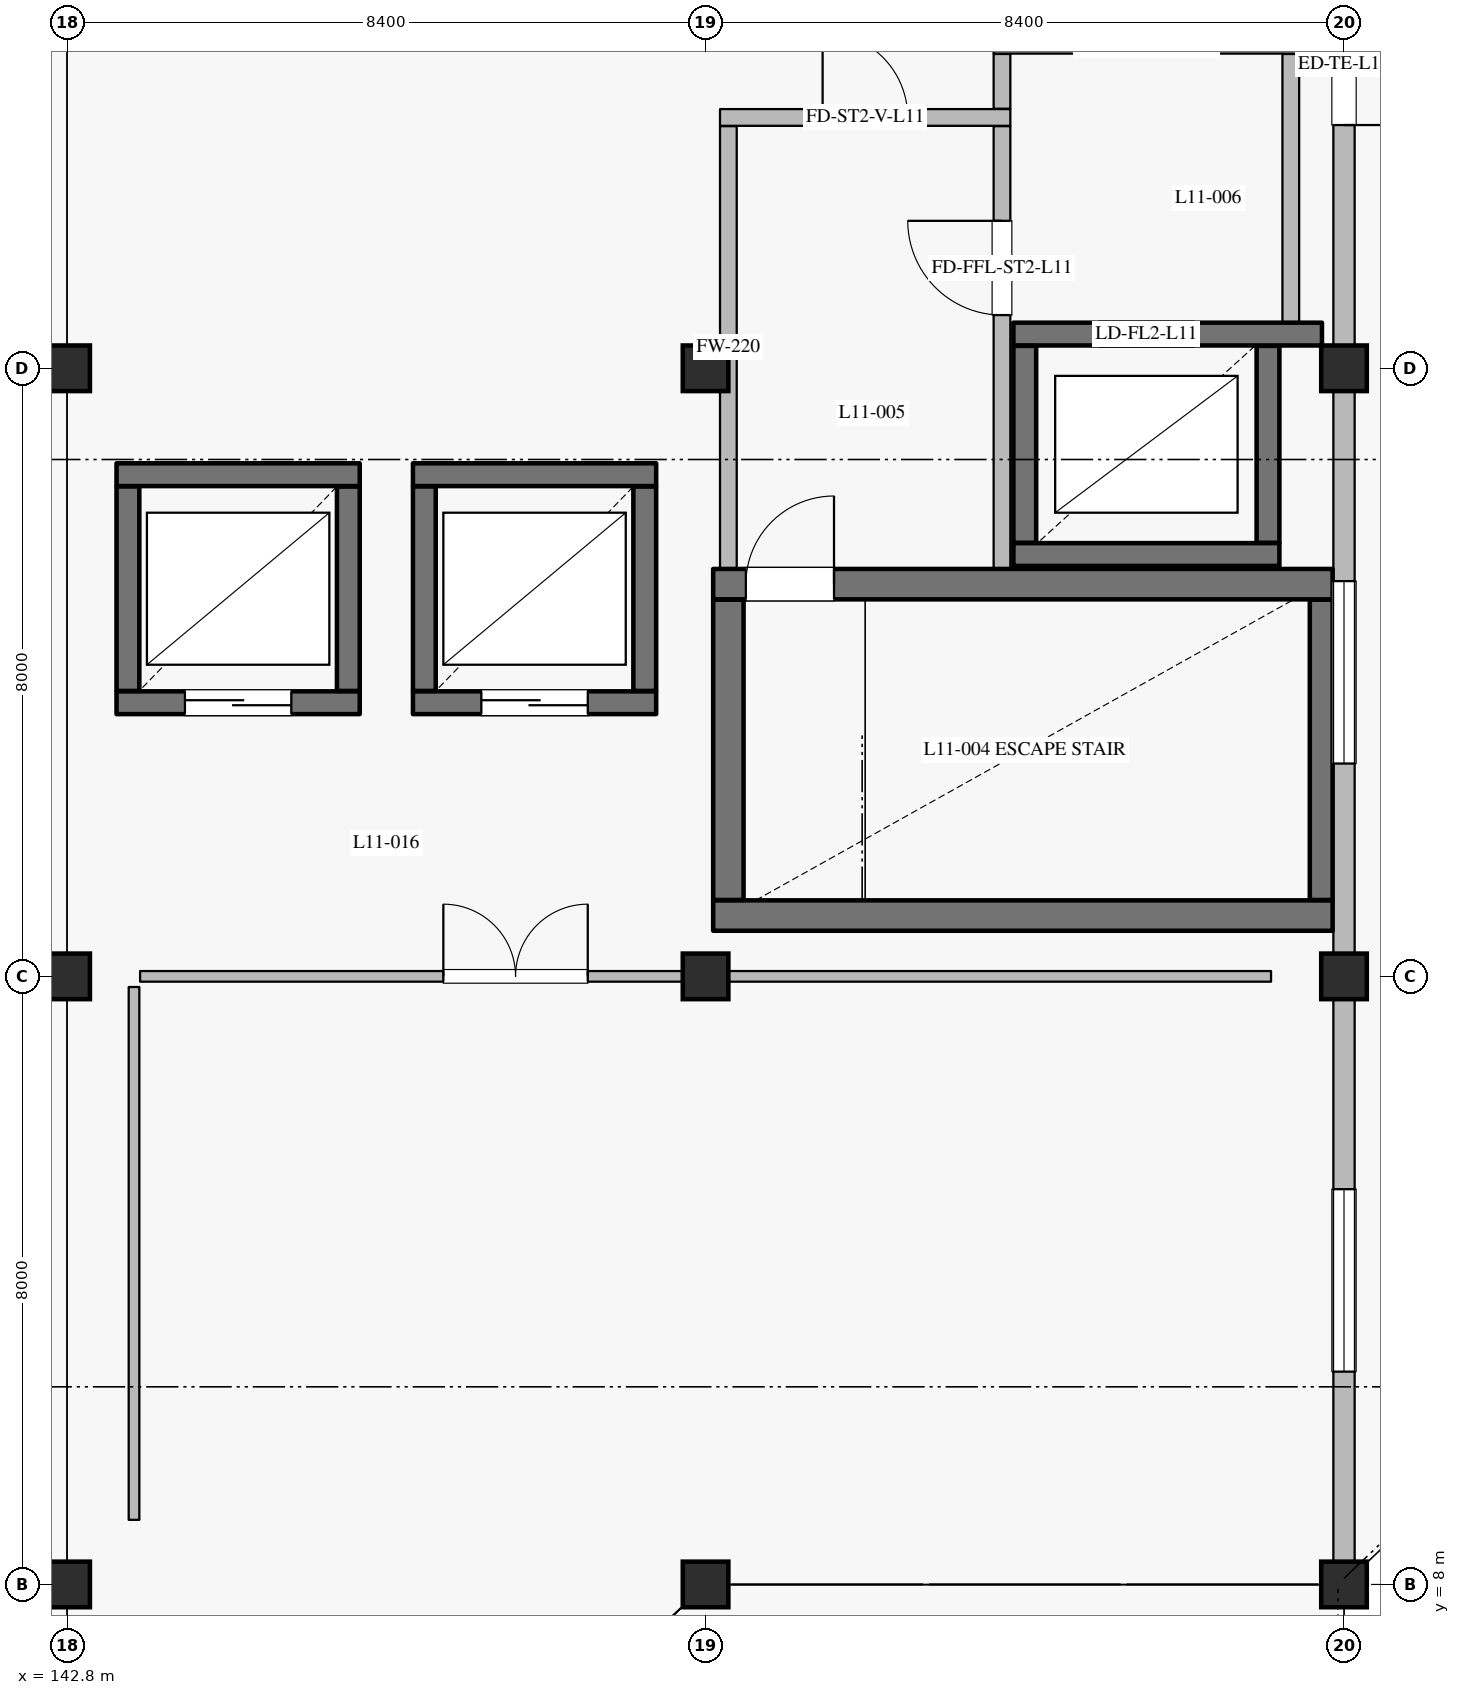
"""IFC4 building model, lengths in metres.
Left out: names, types, materials, properties, quantities, classifications, styles, units other than length and angle.
Written with IfcOpenShell. Run it as: python <this file> out.ifc"""

import sys

from ifc_helpers import new_model, si_unit, direction, frame, frame_2d, origin, origin_2d, place, context, subcontext, project, spatial, rectangle, extrude, element, fill, save


model = new_model("IFC4")
c1 = context("Model", 3, precision=1e-05, world=origin(), true_north=direction((0.0, 1.0)))
c2 = subcontext(c1, "Body", "Model", "MODEL_VIEW")
j1 = project(units=[si_unit("LENGTHUNIT", "METRE"), si_unit("PLANEANGLEUNIT", "RADIAN")], contexts=[c1])
p1 = place(None, origin())
s1 = spatial("IfcSite", under=j1, at=p1, CompositionType="ELEMENT")
p2 = place(p1, origin())
s2 = spatial("IfcBuilding", under=s1, at=p2, CompositionType="ELEMENT")
p3 = place(p2, frame((0.0, 0.0, 47.4)))
s3 = spatial("IfcBuildingStorey", under=s2, at=p3, CompositionType="ELEMENT", Elevation=47.4)
for number, where, z_axis, x_axis in (
    (1, (142.8, 16.0, 0.0), (0.0, 0.0, 1.0), (1.0, 0.0, 0.0)),
    (2, (151.2, 8.0, 0.0), (0.0, 0.0, 1.0), (1.0, 0.0, 0.0)),
    (3, (151.2, 24.0, 0.0), (0.0, 0.0, 1.0), (1.0, 0.0, 0.0)),
    (4, (159.6, 8.0, 0.0), (0.0, 0.0, 1.0), (1.0, 0.0, 0.0)),
    (5, (159.6, 24.0, 0.0), (0.0, 0.0, 1.0), (1.0, 0.0, 0.0)),
    (6, (142.8, 8.0, 0.0), (0.0, 0.0, 1.0), (1.0, 0.0, 0.0)),
    (7, (142.8, 24.0, 0.0), (0.0, 0.0, 1.0), (1.0, 0.0, 0.0)),
    (8, (151.2, 16.0, 0.0), (0.0, 0.0, 1.0), (1.0, 0.0, 0.0)),
    (9, (159.6, 16.0, 0.0), (0.0, 0.0, 1.0), (1.0, 0.0, 0.0)),
):
    element("IfcColumn", number, at=place(p3, frame(where, z_axis=z_axis, x_axis=x_axis)), inside=s3, PredefinedType="COLUMN", context=c2, shape_type="SweptSolid", body=[
        extrude(rectangle(XDim=0.6, YDim=0.6, at=origin_2d()), origin(), (0.0, 0.0, 1.0), 4.2),
    ])
p4 = place(p3, frame((159.6, 31.7, 0.0), z_axis=(0.0, 0.0, 1.0), x_axis=(0.0, -1.0, 0.0)))
e10 = element("IfcWall", 10, at=p4, inside=s3, PredefinedType="SOLIDWALL", context=c2, shape_type="SweptSolid", body=[
    extrude(rectangle(XDim=7.4, YDim=0.28, at=frame_2d((3.7, 0.0))), origin(), (0.0, 0.0, 1.0), 3.3),
])
p5 = place(p4, frame((2.9, 0.0, 0.0)))
e11 = element("IfcOpeningElement", 11, at=p5, cuts=e10, PredefinedType="OPENING", context=c2, shape_type="SweptSolid", body=[
    extrude(rectangle(XDim=1.6, YDim=2.25, at=frame_2d((0.8, 1.125))), frame((0.0, 0.15, 0.0), z_axis=(0.0, -1.0, 0.0), x_axis=(1.0, 0.0, 0.0)), (0.0, 0.0, 1.0), 0.3),
])
p6 = place(p3, frame((159.6, 23.7, 0.0), z_axis=(0.0, 0.0, 1.0), x_axis=(0.0, -1.0, 0.0)))
e12 = element("IfcWall", 12, at=p6, inside=s3, PredefinedType="SOLIDWALL", context=c2, shape_type="SweptSolid", body=[
    extrude(rectangle(XDim=7.4, YDim=0.28, at=frame_2d((3.7, 0.0))), origin(), (0.0, 0.0, 1.0), 3.3),
])
p7 = place(p6, frame((2.5, 0.0, 0.75)))
e13 = element("IfcOpeningElement", 13, at=p7, cuts=e12, PredefinedType="OPENING", context=c2, shape_type="SweptSolid", body=[
    extrude(rectangle(XDim=2.4, YDim=1.65, at=frame_2d((1.2, 0.825))), frame((0.0, 0.15, 0.0), z_axis=(0.0, -1.0, 0.0), x_axis=(1.0, 0.0, 0.0)), (0.0, 0.0, 1.0), 0.3),
])
p8 = place(p3, frame((159.6, 15.7, 0.0), z_axis=(0.0, 0.0, 1.0), x_axis=(0.0, -1.0, 0.0)))
e14 = element("IfcWall", 14, at=p8, inside=s3, PredefinedType="SOLIDWALL", context=c2, shape_type="SweptSolid", body=[
    extrude(rectangle(XDim=7.4, YDim=0.28, at=frame_2d((3.7, 0.0))), origin(), (0.0, 0.0, 1.0), 3.3),
])
p9 = place(p8, frame((2.5, 0.0, 0.75)))
e15 = element("IfcOpeningElement", 15, at=p9, cuts=e14, PredefinedType="OPENING", context=c2, shape_type="SweptSolid", body=[
    extrude(rectangle(XDim=2.4, YDim=1.65, at=frame_2d((1.2, 0.825))), frame((0.0, 0.15, 0.0), z_axis=(0.0, -1.0, 0.0), x_axis=(1.0, 0.0, 0.0)), (0.0, 0.0, 1.0), 0.3),
])
p10 = place(p3, frame((155.25, 21.55, 0.0), z_axis=(0.0, 0.0, 1.0), x_axis=(1.0, 0.0, 0.0)))
e16 = element("IfcWall", 16, at=p10, inside=s3, PredefinedType="SHEAR", context=c2, shape_type="SweptSolid", body=[
    extrude(rectangle(XDim=3.5, YDim=0.3, at=frame_2d((1.75, 0.0))), origin(), (0.0, 0.0, 1.0), 3.935),
])
p11 = place(p3, frame((158.6, 21.705, 0.0), z_axis=(0.0, 0.0, 1.0), x_axis=(0.0, 1.0, 0.0)))
e17 = element("IfcWall", 17, at=p11, inside=s3, PredefinedType="SHEAR", context=c2, shape_type="SweptSolid", body=[
    extrude(rectangle(XDim=2.59, YDim=0.3, at=frame_2d((1.295, 0.0))), origin(), (0.0, 0.0, 1.0), 3.935),
])
p12 = place(p3, frame((159.31, 24.45, 0.0), z_axis=(0.0, 0.0, 1.0), x_axis=(-1.0, 0.0, 0.0)))
e18 = element("IfcWall", 18, at=p12, inside=s3, PredefinedType="SHEAR", context=c2, shape_type="SweptSolid", body=[
    extrude(rectangle(XDim=4.06, YDim=0.3, at=frame_2d((2.03, 0.0))), origin(), (0.0, 0.0, 1.0), 3.935),
])
p13 = place(p12, frame((1.685, 0.0, 0.0)))
e19 = element("IfcOpeningElement", 19, at=p13, cuts=e18, PredefinedType="OPENING", context=c2, shape_type="SweptSolid", body=[
    extrude(rectangle(XDim=1.25, YDim=2.25, at=frame_2d((0.625, 1.125))), frame((0.0, 0.16, 0.0), z_axis=(0.0, -1.0, 0.0), x_axis=(1.0, 0.0, 0.0)), (0.0, 0.0, 1.0), 0.32),
])
p14 = place(p3, frame((155.4, 24.295, 0.0), z_axis=(0.0, 0.0, 1.0), x_axis=(0.0, -1.0, 0.0)))
e20 = element("IfcWall", 20, at=p14, inside=s3, PredefinedType="SHEAR", context=c2, shape_type="SweptSolid", body=[
    extrude(rectangle(XDim=2.59, YDim=0.3, at=frame_2d((1.295, 0.0))), origin(), (0.0, 0.0, 1.0), 3.935),
])
p15 = place(p3, frame((143.45, 19.6, 0.0), z_axis=(0.0, 0.0, 1.0), x_axis=(1.0, 0.0, 0.0)))
e21 = element("IfcWall", 21, at=p15, inside=s3, PredefinedType="SHEAR", context=c2, shape_type="SweptSolid", body=[
    extrude(rectangle(XDim=3.2, YDim=0.3, at=frame_2d((1.6, 0.0))), origin(), (0.0, 0.0, 1.0), 3.935),
])
p16 = place(p15, frame((0.9, 0.0, 0.0)))
e22 = element("IfcOpeningElement", 22, at=p16, cuts=e21, PredefinedType="OPENING", context=c2, shape_type="SweptSolid", body=[
    extrude(rectangle(XDim=1.4, YDim=2.35, at=frame_2d((0.7, 1.175))), frame((0.0, 0.16, 0.0), z_axis=(0.0, -1.0, 0.0), x_axis=(1.0, 0.0, 0.0)), (0.0, 0.0, 1.0), 0.32),
])
p17 = place(p3, frame((146.5, 19.755, 0.0), z_axis=(0.0, 0.0, 1.0), x_axis=(0.0, 1.0, 0.0)))
e23 = element("IfcWall", 23, at=p17, inside=s3, PredefinedType="SHEAR", context=c2, shape_type="SweptSolid", body=[
    extrude(rectangle(XDim=2.69, YDim=0.3, at=frame_2d((1.345, 0.0))), origin(), (0.0, 0.0, 1.0), 3.935),
])
p18 = place(p3, frame((146.65, 22.6, 0.0), z_axis=(0.0, 0.0, 1.0), x_axis=(-1.0, 0.0, 0.0)))
e24 = element("IfcWall", 24, at=p18, inside=s3, PredefinedType="SHEAR", context=c2, shape_type="SweptSolid", body=[
    extrude(rectangle(XDim=3.2, YDim=0.3, at=frame_2d((1.6, 0.0))), origin(), (0.0, 0.0, 1.0), 3.935),
])
p19 = place(p3, frame((143.6, 22.445, 0.0), z_axis=(0.0, 0.0, 1.0), x_axis=(0.0, -1.0, 0.0)))
e25 = element("IfcWall", 25, at=p19, inside=s3, PredefinedType="SHEAR", context=c2, shape_type="SweptSolid", body=[
    extrude(rectangle(XDim=2.69, YDim=0.3, at=frame_2d((1.345, 0.0))), origin(), (0.0, 0.0, 1.0), 3.935),
])
p20 = place(p3, frame((147.35, 19.6, 0.0), z_axis=(0.0, 0.0, 1.0), x_axis=(1.0, 0.0, 0.0)))
e26 = element("IfcWall", 26, at=p20, inside=s3, PredefinedType="SHEAR", context=c2, shape_type="SweptSolid", body=[
    extrude(rectangle(XDim=3.2, YDim=0.3, at=frame_2d((1.6, 0.0))), origin(), (0.0, 0.0, 1.0), 3.935),
])
p21 = place(p20, frame((0.9, 0.0, 0.0)))
e27 = element("IfcOpeningElement", 27, at=p21, cuts=e26, PredefinedType="OPENING", context=c2, shape_type="SweptSolid", body=[
    extrude(rectangle(XDim=1.4, YDim=2.35, at=frame_2d((0.7, 1.175))), frame((0.0, 0.16, 0.0), z_axis=(0.0, -1.0, 0.0), x_axis=(1.0, 0.0, 0.0)), (0.0, 0.0, 1.0), 0.32),
])
p22 = place(p3, frame((150.4, 19.755, 0.0), z_axis=(0.0, 0.0, 1.0), x_axis=(0.0, 1.0, 0.0)))
e28 = element("IfcWall", 28, at=p22, inside=s3, PredefinedType="SHEAR", context=c2, shape_type="SweptSolid", body=[
    extrude(rectangle(XDim=2.69, YDim=0.3, at=frame_2d((1.345, 0.0))), origin(), (0.0, 0.0, 1.0), 3.935),
])
p23 = place(p3, frame((150.55, 22.6, 0.0), z_axis=(0.0, 0.0, 1.0), x_axis=(-1.0, 0.0, 0.0)))
e29 = element("IfcWall", 29, at=p23, inside=s3, PredefinedType="SHEAR", context=c2, shape_type="SweptSolid", body=[
    extrude(rectangle(XDim=3.2, YDim=0.3, at=frame_2d((1.6, 0.0))), origin(), (0.0, 0.0, 1.0), 3.935),
])
p24 = place(p3, frame((147.5, 22.445, 0.0), z_axis=(0.0, 0.0, 1.0), x_axis=(0.0, -1.0, 0.0)))
e30 = element("IfcWall", 30, at=p24, inside=s3, PredefinedType="SHEAR", context=c2, shape_type="SweptSolid", body=[
    extrude(rectangle(XDim=2.69, YDim=0.3, at=frame_2d((1.345, 0.0))), origin(), (0.0, 0.0, 1.0), 3.935),
])
p25 = place(p3, frame((151.3, 16.8, 0.0), z_axis=(0.0, 0.0, 1.0), x_axis=(1.0, 0.0, 0.0)))
e31 = element("IfcWall", 31, at=p25, inside=s3, PredefinedType="SHEAR", context=c2, shape_type="SweptSolid", body=[
    extrude(rectangle(XDim=8.15, YDim=0.4, at=frame_2d((4.075, 0.0))), origin(), (0.0, 0.0, 1.0), 3.935),
])
p26 = place(p3, frame((159.3, 17.005, 0.0), z_axis=(0.0, 0.0, 1.0), x_axis=(0.0, 1.0, 0.0)))
e32 = element("IfcWall", 32, at=p26, inside=s3, PredefinedType="SHEAR", context=c2, shape_type="SweptSolid", body=[
    extrude(rectangle(XDim=3.95, YDim=0.3, at=frame_2d((1.975, 0.0))), origin(), (0.0, 0.0, 1.0), 3.935),
])
p27 = place(p3, frame((151.3, 21.16, 0.0), z_axis=(0.0, 0.0, 1.0), x_axis=(1.0, 0.0, 0.0)))
e33 = element("IfcWall", 33, at=p27, inside=s3, PredefinedType="SHEAR", context=c2, shape_type="SweptSolid", body=[
    extrude(rectangle(XDim=8.15, YDim=0.4, at=frame_2d((4.075, 0.0))), origin(), (0.0, 0.0, 1.0), 3.935),
])
p28 = place(p27, frame((0.43, 0.0, 0.0)))
e34 = element("IfcOpeningElement", 34, at=p28, cuts=e33, PredefinedType="OPENING", context=c2, shape_type="SweptSolid", body=[
    extrude(rectangle(XDim=1.16, YDim=2.2, at=frame_2d((0.58, 1.1))), frame((0.0, 0.21, 0.0), z_axis=(0.0, -1.0, 0.0), x_axis=(1.0, 0.0, 0.0)), (0.0, 0.0, 1.0), 0.42),
])
p29 = place(p3, frame((151.5, 17.005, 0.0), z_axis=(0.0, 0.0, 1.0), x_axis=(0.0, 1.0, 0.0)))
e35 = element("IfcWall", 35, at=p29, inside=s3, PredefinedType="SHEAR", context=c2, shape_type="SweptSolid", body=[
    extrude(rectangle(XDim=3.95, YDim=0.4, at=frame_2d((1.975, 0.0))), origin(), (0.0, 0.0, 1.0), 3.935),
])
p30 = place(p3, frame((151.5, 21.365, 0.0), z_axis=(0.0, 0.0, 1.0), x_axis=(0.0, 1.0, 0.0)))
e36 = element("IfcWall", 36, at=p30, inside=s3, PredefinedType="PARTITIONING", context=c2, shape_type="SweptSolid", body=[
    extrude(rectangle(XDim=5.82, YDim=0.22, at=frame_2d((2.91, 0.0))), origin(), (0.0, 0.0, 1.0), 3.935),
])
p31 = place(p3, frame((151.39, 27.3, 0.0), z_axis=(0.0, 0.0, 1.0), x_axis=(1.0, 0.0, 0.0)))
e37 = element("IfcWall", 37, at=p31, inside=s3, PredefinedType="PARTITIONING", context=c2, shape_type="SweptSolid", body=[
    extrude(rectangle(XDim=3.82, YDim=0.22, at=frame_2d((1.91, 0.0))), origin(), (0.0, 0.0, 1.0), 3.935),
])
p32 = place(p31, frame((1.35, 0.0, 0.0)))
e38 = element("IfcOpeningElement", 38, at=p32, cuts=e37, PredefinedType="OPENING", context=c2, shape_type="SweptSolid", body=[
    extrude(rectangle(XDim=1.12, YDim=2.2, at=frame_2d((0.56, 1.1))), frame((0.0, 0.12, 0.0), z_axis=(0.0, -1.0, 0.0), x_axis=(1.0, 0.0, 0.0)), (0.0, 0.0, 1.0), 0.24),
])
p33 = place(p3, frame((155.1, 21.365, 0.0), z_axis=(0.0, 0.0, 1.0), x_axis=(0.0, 1.0, 0.0)))
e39 = element("IfcWall", 39, at=p33, inside=s3, PredefinedType="PARTITIONING", context=c2, shape_type="SweptSolid", body=[
    extrude(rectangle(XDim=5.82, YDim=0.22, at=frame_2d((2.91, 0.0))), origin(), (0.0, 0.0, 1.0), 3.935),
])
p34 = place(p33, frame((3.335, 0.0, 0.0)))
e40 = element("IfcOpeningElement", 40, at=p34, cuts=e39, PredefinedType="OPENING", context=c2, shape_type="SweptSolid", body=[
    extrude(rectangle(XDim=1.24, YDim=2.2, at=frame_2d((0.62, 1.1))), frame((0.0, 0.12, 0.0), z_axis=(0.0, -1.0, 0.0), x_axis=(1.0, 0.0, 0.0)), (0.0, 0.0, 1.0), 0.24),
])
p35 = place(p3, frame((155.1, 27.415, 0.0), z_axis=(0.0, 0.0, 1.0), x_axis=(0.0, 1.0, 0.0)))
e41 = element("IfcWall", 41, at=p35, inside=s3, PredefinedType="PARTITIONING", context=c2, shape_type="SweptSolid", body=[
    extrude(rectangle(XDim=0.72, YDim=0.22, at=frame_2d((0.36, 0.0))), origin(), (0.0, 0.0, 1.0), 3.935),
])
p36 = place(p3, frame((158.9, 24.605, 0.0), z_axis=(0.0, 0.0, 1.0), x_axis=(0.0, 1.0, 0.0)))
e42 = element("IfcWall", 42, at=p36, inside=s3, PredefinedType="PARTITIONING", context=c2, shape_type="SweptSolid", body=[
    extrude(rectangle(XDim=3.53, YDim=0.22, at=frame_2d((1.765, 0.0))), origin(), (0.0, 0.0, 1.0), 3.935),
])
p37 = place(p3, frame((154.99, 28.25, 0.0), z_axis=(0.0, 0.0, 1.0), x_axis=(1.0, 0.0, 0.0)))
e43 = element("IfcWall", 43, at=p37, inside=s3, PredefinedType="PARTITIONING", context=c2, shape_type="SweptSolid", body=[
    extrude(rectangle(XDim=4.02, YDim=0.22, at=frame_2d((2.01, 0.0))), origin(), (0.0, 0.0, 1.0), 3.935),
])
p38 = place(p37, frame((1.39, 0.0, 0.0)))
e44 = element("IfcOpeningElement", 44, at=p38, cuts=e43, PredefinedType="OPENING", context=c2, shape_type="SweptSolid", body=[
    extrude(rectangle(XDim=1.24, YDim=2.2, at=frame_2d((0.62, 1.1))), frame((0.0, 0.12, 0.0), z_axis=(0.0, -1.0, 0.0), x_axis=(1.0, 0.0, 0.0)), (0.0, 0.0, 1.0), 0.24),
])
p39 = place(p3, frame((143.76, 16.0, 0.0), z_axis=(0.0, 0.0, 1.0), x_axis=(1.0, 0.0, 0.0)))
e45 = element("IfcWall", 45, at=p39, inside=s3, PredefinedType="PARTITIONING", context=c2, shape_type="SweptSolid", body=[
    extrude(rectangle(XDim=7.736, YDim=0.14, at=frame_2d((3.868, 0.0))), origin(), (0.0, 0.0, 1.0), 3.935),
])
p40 = place(p39, frame((3.99, 0.0, 0.0)))
e46 = element("IfcOpeningElement", 46, at=p40, cuts=e45, PredefinedType="OPENING", context=c2, shape_type="SweptSolid", body=[
    extrude(rectangle(XDim=1.9, YDim=2.4, at=frame_2d((0.95, 1.2))), frame((0.0, 0.08, 0.0), z_axis=(0.0, -1.0, 0.0), x_axis=(1.0, 0.0, 0.0)), (0.0, 0.0, 1.0), 0.16),
])
p41 = place(p3, frame((143.68, 8.85, 0.0), z_axis=(0.0, 0.0, 1.0), x_axis=(0.0, 1.0, 0.0)))
e47 = element("IfcWall", 47, at=p41, inside=s3, PredefinedType="PARTITIONING", context=c2, shape_type="SweptSolid", body=[
    extrude(rectangle(XDim=7.01, YDim=0.14, at=frame_2d((3.505, 0.0))), origin(), (0.0, 0.0, 1.0), 3.935),
])
p42 = place(p3, frame((151.496, 16.0, 0.0), z_axis=(0.0, 0.0, 1.0), x_axis=(1.0, 0.0, 0.0)))
e48 = element("IfcWall", 48, at=p42, inside=s3, PredefinedType="PARTITIONING", context=c2, shape_type="SweptSolid", body=[
    extrude(rectangle(XDim=7.144, YDim=0.14, at=frame_2d((3.572, 0.0))), origin(), (0.0, 0.0, 1.0), 3.39),
])
p43 = place(p5, origin())
e49 = element("IfcDoor", 49, at=p43, inside=s3, OperationType="DOUBLE_DOOR_SINGLE_SWING", PredefinedType="DOOR", context=c2, shape_type="SweptSolid", body=[
    extrude(rectangle(XDim=1.6, YDim=2.25, at=frame_2d((0.8, 1.125))), frame((0.0, 0.025, 0.0), z_axis=(0.0, -1.0, 0.0), x_axis=(1.0, 0.0, 0.0)), (0.0, 0.0, 1.0), 0.05),
])
fill(e11, e49)
p44 = place(p7, origin())
e50 = element("IfcWindow", 50, at=p44, inside=s3, PartitioningType="DOUBLE_PANEL_VERTICAL", PredefinedType="WINDOW", context=c2, shape_type="SweptSolid", body=[
    extrude(rectangle(XDim=2.4, YDim=1.65, at=frame_2d((1.2, 0.825))), frame((0.0, 0.03, 0.0), z_axis=(0.0, -1.0, 0.0), x_axis=(1.0, 0.0, 0.0)), (0.0, 0.0, 1.0), 0.06),
])
fill(e13, e50)
p45 = place(p9, origin())
e51 = element("IfcWindow", 51, at=p45, inside=s3, PartitioningType="DOUBLE_PANEL_VERTICAL", PredefinedType="WINDOW", context=c2, shape_type="SweptSolid", body=[
    extrude(rectangle(XDim=2.4, YDim=1.65, at=frame_2d((1.2, 0.825))), frame((0.0, 0.03, 0.0), z_axis=(0.0, -1.0, 0.0), x_axis=(1.0, 0.0, 0.0)), (0.0, 0.0, 1.0), 0.06),
])
fill(e15, e51)
p46 = place(p13, origin())
e52 = element("IfcDoor", 52, at=p46, inside=s3, OperationType="DOUBLE_DOOR_SLIDING", PredefinedType="DOOR", context=c2, shape_type="SweptSolid", body=[
    extrude(rectangle(XDim=1.25, YDim=2.25, at=frame_2d((0.625, 1.125))), frame((0.0, 0.025, 0.0), z_axis=(0.0, -1.0, 0.0), x_axis=(1.0, 0.0, 0.0)), (0.0, 0.0, 1.0), 0.05),
])
fill(e19, e52)
p47 = place(p16, origin())
e53 = element("IfcDoor", 53, at=p47, inside=s3, OperationType="DOUBLE_DOOR_SLIDING", PredefinedType="DOOR", context=c2, shape_type="SweptSolid", body=[
    extrude(rectangle(XDim=1.4, YDim=2.35, at=frame_2d((0.7, 1.175))), frame((0.0, 0.025, 0.0), z_axis=(0.0, -1.0, 0.0), x_axis=(1.0, 0.0, 0.0)), (0.0, 0.0, 1.0), 0.05),
])
fill(e22, e53)
p48 = place(p21, origin())
e54 = element("IfcDoor", 54, at=p48, inside=s3, OperationType="DOUBLE_DOOR_SLIDING", PredefinedType="DOOR", context=c2, shape_type="SweptSolid", body=[
    extrude(rectangle(XDim=1.4, YDim=2.35, at=frame_2d((0.7, 1.175))), frame((0.0, 0.025, 0.0), z_axis=(0.0, -1.0, 0.0), x_axis=(1.0, 0.0, 0.0)), (0.0, 0.0, 1.0), 0.05),
])
fill(e27, e54)
p49 = place(p28, origin())
e55 = element("IfcDoor", 55, at=p49, inside=s3, OperationType="SINGLE_SWING_RIGHT", PredefinedType="DOOR", context=c2, shape_type="SweptSolid", body=[
    extrude(rectangle(XDim=1.16, YDim=2.2, at=frame_2d((0.58, 1.1))), frame((0.0, 0.025, 0.0), z_axis=(0.0, -1.0, 0.0), x_axis=(1.0, 0.0, 0.0)), (0.0, 0.0, 1.0), 0.05),
])
fill(e34, e55)
p50 = place(p32, origin())
e56 = element("IfcDoor", 56, at=p50, inside=s3, OperationType="SINGLE_SWING_LEFT", PredefinedType="DOOR", context=c2, shape_type="SweptSolid", body=[
    extrude(rectangle(XDim=1.12, YDim=2.2, at=frame_2d((0.56, 1.1))), frame((0.0, 0.025, 0.0), z_axis=(0.0, -1.0, 0.0), x_axis=(1.0, 0.0, 0.0)), (0.0, 0.0, 1.0), 0.05),
])
fill(e38, e56)
p51 = place(p34, origin())
e57 = element("IfcDoor", 57, at=p51, inside=s3, OperationType="SINGLE_SWING_RIGHT", PredefinedType="DOOR", context=c2, shape_type="SweptSolid", body=[
    extrude(rectangle(XDim=1.24, YDim=2.2, at=frame_2d((0.62, 1.1))), frame((0.0, 0.025, 0.0), z_axis=(0.0, -1.0, 0.0), x_axis=(1.0, 0.0, 0.0)), (0.0, 0.0, 1.0), 0.05),
])
fill(e40, e57)
p52 = place(p40, origin())
e58 = element("IfcDoor", 58, at=p52, inside=s3, OperationType="DOUBLE_DOOR_SINGLE_SWING", PredefinedType="DOOR", context=c2, shape_type="SweptSolid", body=[
    extrude(rectangle(XDim=1.9, YDim=2.4, at=frame_2d((0.95, 1.2))), frame((0.0, 0.025, 0.0), z_axis=(0.0, -1.0, 0.0), x_axis=(1.0, 0.0, 0.0)), (0.0, 0.0, 1.0), 0.05),
])
fill(e46, e58)
save(model, sys.argv[1])
